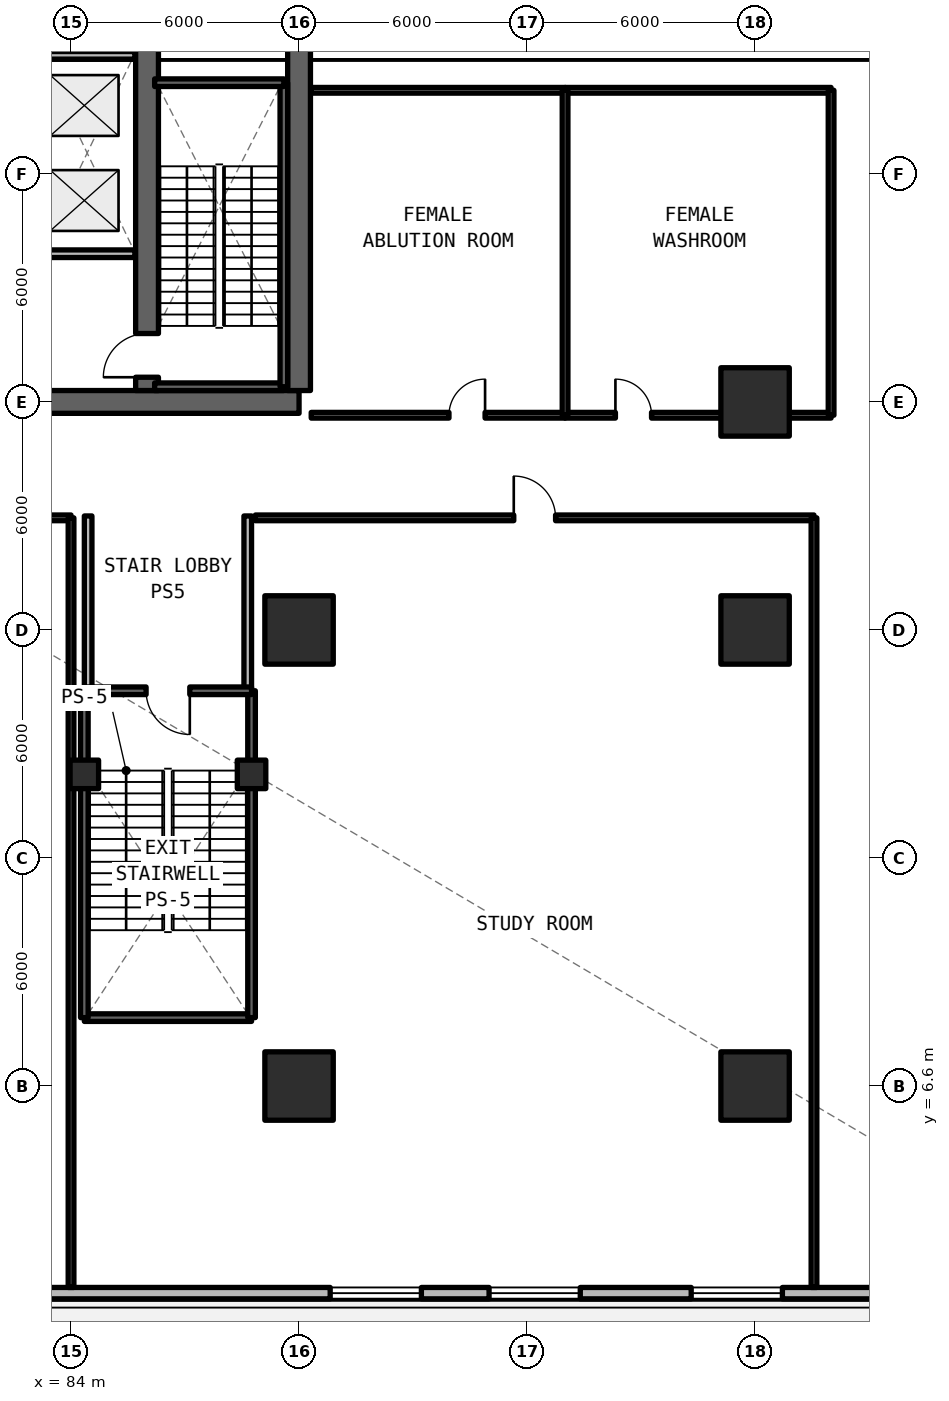
"""IFC4 building model, lengths in metres.
Left out: names, types, materials, properties, quantities, classifications, styles, units other than length and angle.
Written with IfcOpenShell. Run it as: python <this file> out.ifc"""

import sys

from ifc_helpers import new_model, si_unit, direction, frame, frame_2d, origin, origin_2d, place, context, subcontext, project, spatial, rectangle, extrude, element, fill, save


model = new_model("IFC4")
c1 = context("Model", 3, precision=1e-05, world=origin(), true_north=direction((0.0, 1.0)))
c2 = subcontext(c1, "Body", "Model", "MODEL_VIEW")
j1 = project(units=[si_unit("LENGTHUNIT", "METRE"), si_unit("PLANEANGLEUNIT", "RADIAN")], contexts=[c1])
p1 = place(None, origin())
s1 = spatial("IfcSite", under=j1, at=p1, CompositionType="ELEMENT")
p2 = place(p1, origin())
s2 = spatial("IfcBuilding", under=s1, at=p2, CompositionType="ELEMENT")
p3 = place(p2, frame((0.0, 0.0, 4.95)))
s3 = spatial("IfcBuildingStorey", under=s2, at=p3, CompositionType="ELEMENT", Elevation=4.95)
p4 = place(p3, frame((78.0, 24.6, 0.0), z_axis=(0.0, 0.0, 1.0), x_axis=(1.0, 0.0, 0.0)))
e1 = element("IfcWall", 1, at=p4, inside=s3, PredefinedType="SHEAR", context=c2, shape_type="SweptSolid", body=[
    extrude(rectangle(XDim=12.0, YDim=0.6, at=frame_2d((6.0, 0.0))), origin(), (0.0, 0.0, 1.0), 4.95),
])
p5 = place(p3, frame((90.0, 24.9, 0.0), z_axis=(0.0, 0.0, 1.0), x_axis=(0.0, 1.0, 0.0)))
e2 = element("IfcWall", 2, at=p5, inside=s3, PredefinedType="SHEAR", context=c2, shape_type="SweptSolid", body=[
    extrude(rectangle(XDim=17.4, YDim=0.6, at=frame_2d((8.7, 0.0))), origin(), (0.0, 0.0, 1.0), 4.95),
])
p6 = place(p3, frame((86.0, 24.9, 0.0), z_axis=(0.0, 0.0, 1.0), x_axis=(0.0, 1.0, 0.0)))
e3 = element("IfcWall", 3, at=p6, inside=s3, PredefinedType="SHEAR", context=c2, shape_type="SweptSolid", body=[
    extrude(rectangle(XDim=17.4, YDim=0.6, at=frame_2d((8.7, 0.0))), origin(), (0.0, 0.0, 1.0), 4.95),
])
p7 = place(p6, frame((0.35, 0.0, 0.0)))
e4 = element("IfcOpeningElement", 4, at=p7, cuts=e3, PredefinedType="OPENING", context=c2, shape_type="SweptSolid", body=[
    extrude(rectangle(XDim=1.15, YDim=2.15, at=frame_2d((0.575, 1.075))), frame((0.0, 0.31, 0.0), z_axis=(0.0, -1.0, 0.0), x_axis=(1.0, 0.0, 0.0)), (0.0, 0.0, 1.0), 0.62),
])
p8 = place(p6, frame((9.55, 0.0, 0.0)))
e5 = element("IfcOpeningElement", 5, at=p8, cuts=e3, PredefinedType="OPENING", context=c2, shape_type="SweptSolid", body=[
    extrude(rectangle(XDim=1.15, YDim=2.15, at=frame_2d((0.575, 1.075))), frame((0.0, 0.31, 0.0), z_axis=(0.0, -1.0, 0.0), x_axis=(1.0, 0.0, 0.0)), (0.0, 0.0, 1.0), 0.62),
])
for number, where, z_axis, x_axis in (
    (6, (90.0, 6.6, 0.0), (0.0, 0.0, 1.0), (1.0, 0.0, 0.0)),
    (7, (102.0, 6.6, 0.0), (0.0, 0.0, 1.0), (1.0, 0.0, 0.0)),
    (8, (102.0, 24.6, 0.0), (0.0, 0.0, 1.0), (1.0, 0.0, 0.0)),
    (9, (90.0, 18.6, 0.0), (0.0, 0.0, 1.0), (1.0, 0.0, 0.0)),
    (10, (102.0, 18.6, 0.0), (0.0, 0.0, 1.0), (1.0, 0.0, 0.0)),
):
    element("IfcColumn", number, at=place(p3, frame(where, z_axis=z_axis, x_axis=x_axis)), inside=s3, PredefinedType="COLUMN", context=c2, shape_type="SweptSolid", body=[
        extrude(rectangle(XDim=1.8, YDim=1.8, at=origin_2d()), origin(), (0.0, 0.0, 1.0), 4.95),
    ])
for number, where, z_axis, x_axis in (
    (11, (84.35, 14.8, 0.0), (0.0, 0.0, 1.0), (1.0, 0.0, 0.0)),
    (12, (88.75, 14.8, 0.0), (0.0, 0.0, 1.0), (1.0, 0.0, 0.0)),
):
    element("IfcColumn", number, at=place(p3, frame(where, z_axis=z_axis, x_axis=x_axis)), inside=s3, PredefinedType="COLUMN", context=c2, shape_type="SweptSolid", body=[
        extrude(rectangle(XDim=0.75, YDim=0.75, at=origin_2d()), origin(), (0.0, 0.0, 1.0), 4.95),
    ])
p9 = place(p3, frame((64.2, 1.15, 0.0), z_axis=(0.0, 0.0, 1.0), x_axis=(1.0, 0.0, 0.0)))
e13 = element("IfcWall", 13, at=p9, inside=s3, PredefinedType="SOLIDWALL", context=c2, shape_type="SweptSolid", body=[
    extrude(rectangle(XDim=46.138, YDim=0.3, at=frame_2d((23.069, 0.0))), origin(), (0.0, 0.0, 1.0), 4.67),
])
p10 = place(p9, frame((8.7, 0.0, 0.78)))
e14 = element("IfcOpeningElement", 14, at=p10, cuts=e13, PredefinedType="OPENING", context=c2, shape_type="SweptSolid", body=[
    extrude(rectangle(XDim=2.4, YDim=1.66, at=frame_2d((1.2, 0.83))), frame((0.0, 0.16, 0.0), z_axis=(0.0, -1.0, 0.0), x_axis=(1.0, 0.0, 0.0)), (0.0, 0.0, 1.0), 0.32),
])
p11 = place(p9, frame((30.8, 0.0, 0.78)))
e15 = element("IfcOpeningElement", 15, at=p11, cuts=e13, PredefinedType="OPENING", context=c2, shape_type="SweptSolid", body=[
    extrude(rectangle(XDim=2.4, YDim=1.66, at=frame_2d((1.2, 0.83))), frame((0.0, 0.16, 0.0), z_axis=(0.0, -1.0, 0.0), x_axis=(1.0, 0.0, 0.0)), (0.0, 0.0, 1.0), 0.32),
])
p12 = place(p9, frame((41.544, 0.0, 0.78)))
e16 = element("IfcOpeningElement", 16, at=p12, cuts=e13, PredefinedType="OPENING", context=c2, shape_type="SweptSolid", body=[
    extrude(rectangle(XDim=2.4, YDim=1.66, at=frame_2d((1.2, 0.83))), frame((0.0, 0.16, 0.0), z_axis=(0.0, -1.0, 0.0), x_axis=(1.0, 0.0, 0.0)), (0.0, 0.0, 1.0), 0.32),
])
p13 = place(p9, frame((26.619, 0.0, 0.78)))
e17 = element("IfcOpeningElement", 17, at=p13, cuts=e13, PredefinedType="OPENING", context=c2, shape_type="SweptSolid", body=[
    extrude(rectangle(XDim=2.4, YDim=1.66, at=frame_2d((1.2, 0.83))), frame((0.0, 0.16, 0.0), z_axis=(0.0, -1.0, 0.0), x_axis=(1.0, 0.0, 0.0)), (0.0, 0.0, 1.0), 0.32),
])
p14 = place(p9, frame((36.119, 0.0, 0.78)))
e18 = element("IfcOpeningElement", 18, at=p14, cuts=e13, PredefinedType="OPENING", context=c2, shape_type="SweptSolid", body=[
    extrude(rectangle(XDim=2.4, YDim=1.66, at=frame_2d((1.2, 0.83))), frame((0.0, 0.16, 0.0), z_axis=(0.0, -1.0, 0.0), x_axis=(1.0, 0.0, 0.0)), (0.0, 0.0, 1.0), 0.32),
])
p15 = place(p3, frame((78.32, 28.5, 0.0), z_axis=(0.0, 0.0, 1.0), x_axis=(1.0, 0.0, 0.0)))
e19 = element("IfcWall", 19, at=p15, inside=s3, PredefinedType="SOLIDWALL", context=c2, shape_type="SweptSolid", body=[
    extrude(rectangle(XDim=7.36, YDim=0.2, at=frame_2d((3.68, 0.0))), origin(), (0.0, 0.0, 1.0), 3.89),
])
p16 = place(p15, frame((3.48, 0.0, 0.0)))
e20 = element("IfcOpeningElement", 20, at=p16, cuts=e19, PredefinedType="OPENING", context=c2, shape_type="SweptSolid", body=[
    extrude(rectangle(XDim=1.0, YDim=2.15, at=frame_2d((0.5, 1.075))), frame((0.0, 0.11, 0.0), z_axis=(0.0, -1.0, 0.0), x_axis=(1.0, 0.0, 0.0)), (0.0, 0.0, 1.0), 0.22),
])
p17 = place(p3, frame((83.2, 33.72, 0.0), z_axis=(0.0, 0.0, 1.0), x_axis=(1.0, 0.0, 0.0)))
e21 = element("IfcWall", 21, at=p17, inside=s3, PredefinedType="SOLIDWALL", context=c2, shape_type="SweptSolid", body=[
    extrude(rectangle(XDim=2.48, YDim=0.2, at=frame_2d((1.24, 0.0))), origin(), (0.0, 0.0, 1.0), 3.89),
])
for number, where, z_axis, x_axis in (
    (22, (84.45, 17.0, 0.0), (0.0, 0.0, 1.0), (0.0, 1.0, 0.0)),
    (23, (88.65, 17.0, 0.0), (0.0, 0.0, 1.0), (0.0, 1.0, 0.0)),
):
    element("IfcWall", number, at=place(p3, frame(where, z_axis=z_axis, x_axis=x_axis)), inside=s3, PredefinedType="SOLIDWALL", context=c2, shape_type="SweptSolid", body=[
        extrude(rectangle(XDim=4.6, YDim=0.2, at=frame_2d((2.3, 0.0))), origin(), (0.0, 0.0, 1.0), 3.89),
    ])
p18 = place(p3, frame((48.75, 21.55, 0.0), z_axis=(0.0, 0.0, 1.0), x_axis=(1.0, 0.0, 0.0)))
e24 = element("IfcWall", 24, at=p18, inside=s3, PredefinedType="SOLIDWALL", context=c2, shape_type="SweptSolid", body=[
    extrude(rectangle(XDim=35.25, YDim=0.15, at=frame_2d((17.625, 0.0))), origin(), (0.0, 0.0, 1.0), 3.89),
])
p19 = place(p18, frame((17.3, 0.0, 0.0)))
e25 = element("IfcOpeningElement", 25, at=p19, cuts=e24, PredefinedType="OPENING", context=c2, shape_type="SweptSolid", body=[
    extrude(rectangle(XDim=1.4, YDim=2.15, at=frame_2d((0.7, 1.075))), frame((0.0, 0.085, 0.0), z_axis=(0.0, -1.0, 0.0), x_axis=(1.0, 0.0, 0.0)), (0.0, 0.0, 1.0), 0.17),
])
p20 = place(p3, frame((84.0, 1.3, 0.0), z_axis=(0.0, 0.0, 1.0), x_axis=(0.0, 1.0, 0.0)))
e26 = element("IfcWall", 26, at=p20, inside=s3, PredefinedType="SOLIDWALL", context=c2, shape_type="SweptSolid", body=[
    extrude(rectangle(XDim=20.25, YDim=0.15, at=frame_2d((10.125, 0.0))), origin(), (0.0, 0.0, 1.0), 3.89),
])
p21 = place(p3, frame((90.32, 24.25, 0.0), z_axis=(0.0, 0.0, 1.0), x_axis=(1.0, 0.0, 0.0)))
e27 = element("IfcWall", 27, at=p21, inside=s3, PredefinedType="SOLIDWALL", context=c2, shape_type="SweptSolid", body=[
    extrude(rectangle(XDim=6.68, YDim=0.15, at=frame_2d((3.34, 0.0))), origin(), (0.0, 0.0, 1.0), 3.89),
])
p22 = place(p21, frame((3.625, 0.0, 0.0)))
e28 = element("IfcOpeningElement", 28, at=p22, cuts=e27, PredefinedType="OPENING", context=c2, shape_type="SweptSolid", body=[
    extrude(rectangle(XDim=0.95, YDim=2.15, at=frame_2d((0.475, 1.075))), frame((0.0, 0.085, 0.0), z_axis=(0.0, -1.0, 0.0), x_axis=(1.0, 0.0, 0.0)), (0.0, 0.0, 1.0), 0.17),
])
p23 = place(p3, frame((90.32, 32.8, 0.0), z_axis=(0.0, 0.0, 1.0), x_axis=(1.0, 0.0, 0.0)))
e29 = element("IfcWall", 29, at=p23, inside=s3, PredefinedType="SOLIDWALL", context=c2, shape_type="SweptSolid", body=[
    extrude(rectangle(XDim=6.68, YDim=0.15, at=frame_2d((3.34, 0.0))), origin(), (0.0, 0.0, 1.0), 3.89),
])
p24 = place(p3, frame((97.0, 24.25, 0.0), z_axis=(0.0, 0.0, 1.0), x_axis=(1.0, 0.0, 0.0)))
e30 = element("IfcWall", 30, at=p24, inside=s3, PredefinedType="SOLIDWALL", context=c2, shape_type="SweptSolid", body=[
    extrude(rectangle(XDim=7.0, YDim=0.15, at=frame_2d((3.5, 0.0))), origin(), (0.0, 0.0, 1.0), 3.89),
])
p25 = place(p24, frame((1.325, 0.0, 0.0)))
e31 = element("IfcOpeningElement", 31, at=p25, cuts=e30, PredefinedType="OPENING", context=c2, shape_type="SweptSolid", body=[
    extrude(rectangle(XDim=0.95, YDim=2.15, at=frame_2d((0.475, 1.075))), frame((0.0, 0.085, 0.0), z_axis=(0.0, -1.0, 0.0), x_axis=(1.0, 0.0, 0.0)), (0.0, 0.0, 1.0), 0.17),
])
p26 = place(p3, frame((97.0, 32.8, 0.0), z_axis=(0.0, 0.0, 1.0), x_axis=(1.0, 0.0, 0.0)))
e32 = element("IfcWall", 32, at=p26, inside=s3, PredefinedType="SOLIDWALL", context=c2, shape_type="SweptSolid", body=[
    extrude(rectangle(XDim=7.0, YDim=0.15, at=frame_2d((3.5, 0.0))), origin(), (0.0, 0.0, 1.0), 3.89),
])
for number, where, z_axis, x_axis in (
    (33, (97.0, 24.25, 0.0), (0.0, 0.0, 1.0), (0.0, 1.0, 0.0)),
    (34, (104.0, 24.25, 0.0), (0.0, 0.0, 1.0), (0.0, 1.0, 0.0)),
):
    element("IfcWall", number, at=place(p3, frame(where, z_axis=z_axis, x_axis=x_axis)), inside=s3, PredefinedType="SOLIDWALL", context=c2, shape_type="SweptSolid", body=[
        extrude(rectangle(XDim=8.55, YDim=0.15, at=frame_2d((4.275, 0.0))), origin(), (0.0, 0.0, 1.0), 3.89),
    ])
p27 = place(p3, frame((88.85, 21.55, 0.0), z_axis=(0.0, 0.0, 1.0), x_axis=(1.0, 0.0, 0.0)))
e35 = element("IfcWall", 35, at=p27, inside=s3, PredefinedType="SOLIDWALL", context=c2, shape_type="SweptSolid", body=[
    extrude(rectangle(XDim=14.7, YDim=0.15, at=frame_2d((7.35, 0.0))), origin(), (0.0, 0.0, 1.0), 3.89),
])
p28 = place(p27, frame((6.8, 0.0, 0.0)))
e36 = element("IfcOpeningElement", 36, at=p28, cuts=e35, PredefinedType="OPENING", context=c2, shape_type="SweptSolid", body=[
    extrude(rectangle(XDim=1.1, YDim=2.15, at=frame_2d((0.55, 1.075))), frame((0.0, 0.085, 0.0), z_axis=(0.0, -1.0, 0.0), x_axis=(1.0, 0.0, 0.0)), (0.0, 0.0, 1.0), 0.17),
])
p29 = place(p3, frame((103.55, 1.3, 0.0), z_axis=(0.0, 0.0, 1.0), x_axis=(0.0, 1.0, 0.0)))
e37 = element("IfcWall", 37, at=p29, inside=s3, PredefinedType="SOLIDWALL", context=c2, shape_type="SweptSolid", body=[
    extrude(rectangle(XDim=20.25, YDim=0.15, at=frame_2d((10.125, 0.0))), origin(), (0.0, 0.0, 1.0), 3.89),
])
p30 = place(p3, frame((86.2, 25.0, 0.0), z_axis=(0.0, 0.0, 1.0), x_axis=(1.0, 0.0, 0.0)))
e38 = element("IfcWall", 38, at=p30, inside=s3, PredefinedType="SOLIDWALL", context=c2, shape_type="SweptSolid", body=[
    extrude(rectangle(XDim=3.4, YDim=0.2, at=frame_2d((1.7, 0.0))), origin(), (0.0, 0.0, 1.0), 4.95),
])
p31 = place(p3, frame((89.6, 25.0, 0.0), z_axis=(0.0, 0.0, 1.0), x_axis=(0.0, 1.0, 0.0)))
e39 = element("IfcWall", 39, at=p31, inside=s3, PredefinedType="SOLIDWALL", context=c2, shape_type="SweptSolid", body=[
    extrude(rectangle(XDim=8.0, YDim=0.2, at=frame_2d((4.0, 0.0))), origin(), (0.0, 0.0, 1.0), 4.95),
])
p32 = place(p3, frame((89.6, 33.0, 0.0), z_axis=(0.0, 0.0, 1.0), x_axis=(-1.0, 0.0, 0.0)))
e40 = element("IfcWall", 40, at=p32, inside=s3, PredefinedType="SOLIDWALL", context=c2, shape_type="SweptSolid", body=[
    extrude(rectangle(XDim=3.4, YDim=0.2, at=frame_2d((1.7, 0.0))), origin(), (0.0, 0.0, 1.0), 4.95),
])
p33 = place(p3, frame((84.35, 8.4, 0.0), z_axis=(0.0, 0.0, 1.0), x_axis=(1.0, 0.0, 0.0)))
e41 = element("IfcWall", 41, at=p33, inside=s3, PredefinedType="SOLIDWALL", context=c2, shape_type="SweptSolid", body=[
    extrude(rectangle(XDim=4.4, YDim=0.2, at=frame_2d((2.2, 0.0))), origin(), (0.0, 0.0, 1.0), 4.95),
])
p34 = place(p3, frame((88.75, 8.4, 0.0), z_axis=(0.0, 0.0, 1.0), x_axis=(0.0, 1.0, 0.0)))
e42 = element("IfcWall", 42, at=p34, inside=s3, PredefinedType="SOLIDWALL", context=c2, shape_type="SweptSolid", body=[
    extrude(rectangle(XDim=8.6, YDim=0.2, at=frame_2d((4.3, 0.0))), origin(), (0.0, 0.0, 1.0), 4.95),
])
p35 = place(p3, frame((88.75, 17.0, 0.0), z_axis=(0.0, 0.0, 1.0), x_axis=(-1.0, 0.0, 0.0)))
e43 = element("IfcWall", 43, at=p35, inside=s3, PredefinedType="SOLIDWALL", context=c2, shape_type="SweptSolid", body=[
    extrude(rectangle(XDim=4.4, YDim=0.2, at=frame_2d((2.2, 0.0))), origin(), (0.0, 0.0, 1.0), 4.95),
])
p36 = place(p35, frame((1.625, 0.0, 0.0)))
e44 = element("IfcOpeningElement", 44, at=p36, cuts=e43, PredefinedType="OPENING", context=c2, shape_type="SweptSolid", body=[
    extrude(rectangle(XDim=1.15, YDim=2.15, at=frame_2d((0.575, 1.075))), frame((0.0, 0.11, 0.0), z_axis=(0.0, -1.0, 0.0), x_axis=(1.0, 0.0, 0.0)), (0.0, 0.0, 1.0), 0.22),
])
p37 = place(p3, frame((84.35, 17.0, 0.0), z_axis=(0.0, 0.0, 1.0), x_axis=(0.0, -1.0, 0.0)))
e45 = element("IfcWall", 45, at=p37, inside=s3, PredefinedType="SOLIDWALL", context=c2, shape_type="SweptSolid", body=[
    extrude(rectangle(XDim=8.6, YDim=0.2, at=frame_2d((4.3, 0.0))), origin(), (0.0, 0.0, 1.0), 4.95),
])
p38 = place(p11, origin())
e46 = element("IfcWindow", 46, at=p38, inside=s3, PartitioningType="SINGLE_PANEL", PredefinedType="WINDOW", context=c2, shape_type="SweptSolid", body=[
    extrude(rectangle(XDim=2.4, YDim=1.66, at=frame_2d((1.2, 0.83))), frame((0.0, 0.03, 0.0), z_axis=(0.0, -1.0, 0.0), x_axis=(1.0, 0.0, 0.0)), (0.0, 0.0, 1.0), 0.06),
])
fill(e15, e46)
p39 = place(p13, origin())
e47 = element("IfcWindow", 47, at=p39, inside=s3, PartitioningType="SINGLE_PANEL", PredefinedType="WINDOW", context=c2, shape_type="SweptSolid", body=[
    extrude(rectangle(XDim=2.4, YDim=1.66, at=frame_2d((1.2, 0.83))), frame((0.0, 0.03, 0.0), z_axis=(0.0, -1.0, 0.0), x_axis=(1.0, 0.0, 0.0)), (0.0, 0.0, 1.0), 0.06),
])
fill(e17, e47)
p40 = place(p14, origin())
e48 = element("IfcWindow", 48, at=p40, inside=s3, PartitioningType="SINGLE_PANEL", PredefinedType="WINDOW", context=c2, shape_type="SweptSolid", body=[
    extrude(rectangle(XDim=2.4, YDim=1.66, at=frame_2d((1.2, 0.83))), frame((0.0, 0.03, 0.0), z_axis=(0.0, -1.0, 0.0), x_axis=(1.0, 0.0, 0.0)), (0.0, 0.0, 1.0), 0.06),
])
fill(e18, e48)
p41 = place(p22, origin())
e49 = element("IfcDoor", 49, at=p41, inside=s3, OperationType="SINGLE_SWING_RIGHT", PredefinedType="DOOR", context=c2, shape_type="SweptSolid", body=[
    extrude(rectangle(XDim=0.95, YDim=2.15, at=frame_2d((0.475, 1.075))), frame((0.0, 0.025, 0.0), z_axis=(0.0, -1.0, 0.0), x_axis=(1.0, 0.0, 0.0)), (0.0, 0.0, 1.0), 0.05),
])
fill(e28, e49)
p42 = place(p25, origin())
e50 = element("IfcDoor", 50, at=p42, inside=s3, OperationType="SINGLE_SWING_LEFT", PredefinedType="DOOR", context=c2, shape_type="SweptSolid", body=[
    extrude(rectangle(XDim=0.95, YDim=2.15, at=frame_2d((0.475, 1.075))), frame((0.0, 0.025, 0.0), z_axis=(0.0, -1.0, 0.0), x_axis=(1.0, 0.0, 0.0)), (0.0, 0.0, 1.0), 0.05),
])
fill(e31, e50)
p43 = place(p28, origin())
e51 = element("IfcDoor", 51, at=p43, inside=s3, OperationType="SINGLE_SWING_LEFT", PredefinedType="DOOR", context=c2, shape_type="SweptSolid", body=[
    extrude(rectangle(XDim=1.1, YDim=2.15, at=frame_2d((0.55, 1.075))), frame((0.0, 0.025, 0.0), z_axis=(0.0, -1.0, 0.0), x_axis=(1.0, 0.0, 0.0)), (0.0, 0.0, 1.0), 0.05),
])
fill(e36, e51)
p44 = place(p7, origin())
e52 = element("IfcDoor", 52, at=p44, inside=s3, OperationType="SINGLE_SWING_RIGHT", PredefinedType="DOOR", context=c2, shape_type="SweptSolid", body=[
    extrude(rectangle(XDim=1.15, YDim=2.15, at=frame_2d((0.575, 1.075))), frame((0.0, 0.025, 0.0), z_axis=(0.0, -1.0, 0.0), x_axis=(1.0, 0.0, 0.0)), (0.0, 0.0, 1.0), 0.05),
])
fill(e4, e52)
p45 = place(p36, origin())
e53 = element("IfcDoor", 53, at=p45, inside=s3, OperationType="SINGLE_SWING_RIGHT", PredefinedType="DOOR", context=c2, shape_type="SweptSolid", body=[
    extrude(rectangle(XDim=1.15, YDim=2.15, at=frame_2d((0.575, 1.075))), frame((0.0, 0.025, 0.0), z_axis=(0.0, -1.0, 0.0), x_axis=(1.0, 0.0, 0.0)), (0.0, 0.0, 1.0), 0.05),
])
fill(e44, e53)
save(model, sys.argv[1])
